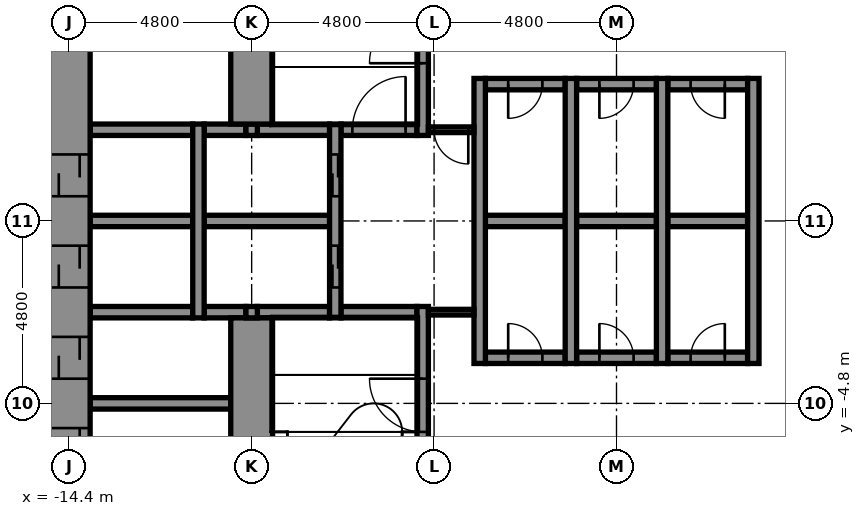
"""IFC4 building model, lengths in metres.
Left out: names, types, materials, properties, quantities, classifications, styles, units other than length and angle.
Written with IfcOpenShell. Run it as: python <this file> out.ifc"""

import sys

from ifc_helpers import new_model, si_unit, direction, frame, frame_2d, origin, place, context, subcontext, project, spatial, rectangle, extrude, element, fill, save


model = new_model("IFC4")
c1 = context("Model", 3, precision=1e-05, world=origin(), true_north=direction((0.0, 1.0)))
c2 = subcontext(c1, "Body", "Model", "MODEL_VIEW")
j1 = project(units=[si_unit("LENGTHUNIT", "METRE"), si_unit("PLANEANGLEUNIT", "RADIAN")], contexts=[c1])
p1 = place(None, origin())
s1 = spatial("IfcSite", under=j1, at=p1, CompositionType="ELEMENT")
p2 = place(p1, origin())
s2 = spatial("IfcBuilding", under=s1, at=p2, CompositionType="ELEMENT")
p3 = place(p2, frame((0.0, 0.0, 17.4)))
s3 = spatial("IfcBuildingStorey", under=s2, at=p3, CompositionType="ELEMENT", Elevation=17.4)
p4 = place(p3, frame((-13.85, -4.8, -0.25), z_axis=(0.0, 0.0, 1.0), x_axis=(1.0, 0.0, 0.0)))
e1 = element("IfcWall", 1, at=p4, inside=s3, PredefinedType="STANDARD", context=c2, shape_type="SweptSolid", body=[
    extrude(rectangle(XDim=3.7, YDim=0.3, at=frame_2d((1.85, 0.0))), origin(), (0.0, 0.0, 1.0), 5.0),
])
p5 = place(p3, frame((-3.45, -3.6, -0.25), z_axis=(0.0, 0.0, 1.0), x_axis=(1.0, 0.0, 0.0)))
e2 = element("IfcWall", 2, at=p5, inside=s3, PredefinedType="STANDARD", context=c2, shape_type="SweptSolid", body=[
    extrude(rectangle(XDim=2.1, YDim=0.3, at=frame_2d((1.05, 0.0))), origin(), (0.0, 0.0, 1.0), 5.0),
])
p6 = place(p5, frame((0.6, 0.0, 0.25)))
e3 = element("IfcOpeningElement", 3, at=p6, cuts=e2, PredefinedType="OPENING", context=c2, shape_type="SweptSolid", body=[
    extrude(rectangle(XDim=0.9, YDim=2.1, at=frame_2d((0.45, 1.05))), frame((0.0, 0.16, 0.0), z_axis=(0.0, -1.0, 0.0), x_axis=(1.0, 0.0, 0.0)), (0.0, 0.0, 1.0), 0.32),
])
p7 = place(p3, frame((-1.05, -3.6, -0.25), z_axis=(0.0, 0.0, 1.0), x_axis=(1.0, 0.0, 0.0)))
e4 = element("IfcWall", 4, at=p7, inside=s3, PredefinedType="STANDARD", context=c2, shape_type="SweptSolid", body=[
    extrude(rectangle(XDim=2.1, YDim=0.3, at=frame_2d((1.05, 0.0))), origin(), (0.0, 0.0, 1.0), 5.0),
])
p8 = place(p7, frame((0.6, 0.0, 0.25)))
e5 = element("IfcOpeningElement", 5, at=p8, cuts=e4, PredefinedType="OPENING", context=c2, shape_type="SweptSolid", body=[
    extrude(rectangle(XDim=0.9, YDim=2.1, at=frame_2d((0.45, 1.05))), frame((0.0, 0.16, 0.0), z_axis=(0.0, -1.0, 0.0), x_axis=(1.0, 0.0, 0.0)), (0.0, 0.0, 1.0), 0.32),
])
p9 = place(p3, frame((1.35, -3.6, -0.25), z_axis=(0.0, 0.0, 1.0), x_axis=(1.0, 0.0, 0.0)))
e6 = element("IfcWall", 6, at=p9, inside=s3, PredefinedType="STANDARD", context=c2, shape_type="SweptSolid", body=[
    extrude(rectangle(XDim=2.1, YDim=0.3, at=frame_2d((1.05, 0.0))), origin(), (0.0, 0.0, 1.0), 5.0),
])
p10 = place(p9, frame((0.6, 0.0, 0.25)))
e7 = element("IfcOpeningElement", 7, at=p10, cuts=e6, PredefinedType="OPENING", context=c2, shape_type="SweptSolid", body=[
    extrude(rectangle(XDim=0.9, YDim=2.1, at=frame_2d((0.45, 1.05))), frame((0.0, 0.16, 0.0), z_axis=(0.0, -1.0, 0.0), x_axis=(1.0, 0.0, 0.0)), (0.0, 0.0, 1.0), 0.32),
])
p11 = place(p3, frame((-13.85, -2.4, -0.25), z_axis=(0.0, 0.0, 1.0), x_axis=(1.0, 0.0, 0.0)))
e8 = element("IfcWall", 8, at=p11, inside=s3, PredefinedType="STANDARD", context=c2, shape_type="SweptSolid", body=[
    extrude(rectangle(XDim=2.7, YDim=0.3, at=frame_2d((1.35, 0.0))), origin(), (0.0, 0.0, 1.0), 5.0),
])
p12 = place(p3, frame((-10.85, -2.4, -0.25), z_axis=(0.0, 0.0, 1.0), x_axis=(1.0, 0.0, 0.0)))
e9 = element("IfcWall", 9, at=p12, inside=s3, PredefinedType="STANDARD", context=c2, shape_type="SweptSolid", body=[
    extrude(rectangle(XDim=1.1, YDim=0.3, at=frame_2d((0.55, 0.0))), origin(), (0.0, 0.0, 1.0), 5.0),
])
p13 = place(p3, frame((-9.45, -2.4, -0.25), z_axis=(0.0, 0.0, 1.0), x_axis=(1.0, 0.0, 0.0)))
e10 = element("IfcWall", 10, at=p13, inside=s3, PredefinedType="STANDARD", context=c2, shape_type="SweptSolid", body=[
    extrude(rectangle(XDim=1.9, YDim=0.3, at=frame_2d((0.95, 0.0))), origin(), (0.0, 0.0, 1.0), 5.0),
])
p14 = place(p3, frame((-7.25, -2.4, -0.25), z_axis=(0.0, 0.0, 1.0), x_axis=(1.0, 0.0, 0.0)))
e11 = element("IfcWall", 11, at=p14, inside=s3, PredefinedType="STANDARD", context=c2, shape_type="SweptSolid", body=[
    extrude(rectangle(XDim=2.0, YDim=0.3, at=frame_2d((1.0, 0.0))), origin(), (0.0, 0.0, 1.0), 5.0),
])
p15 = place(p3, frame((-13.85, 0.0, -0.25), z_axis=(0.0, 0.0, 1.0), x_axis=(1.0, 0.0, 0.0)))
e12 = element("IfcWall", 12, at=p15, inside=s3, PredefinedType="STANDARD", context=c2, shape_type="SweptSolid", body=[
    extrude(rectangle(XDim=2.7, YDim=0.3, at=frame_2d((1.35, 0.0))), origin(), (0.0, 0.0, 1.0), 5.0),
])
p16 = place(p3, frame((-10.85, 0.0, -0.25), z_axis=(0.0, 0.0, 1.0), x_axis=(1.0, 0.0, 0.0)))
e13 = element("IfcWall", 13, at=p16, inside=s3, PredefinedType="STANDARD", context=c2, shape_type="SweptSolid", body=[
    extrude(rectangle(XDim=3.3, YDim=0.3, at=frame_2d((1.65, 0.0))), origin(), (0.0, 0.0, 1.0), 5.0),
])
p17 = place(p3, frame((-3.45, 0.0, -0.25), z_axis=(0.0, 0.0, 1.0), x_axis=(1.0, 0.0, 0.0)))
e14 = element("IfcWall", 14, at=p17, inside=s3, PredefinedType="STANDARD", context=c2, shape_type="SweptSolid", body=[
    extrude(rectangle(XDim=2.1, YDim=0.3, at=frame_2d((1.05, 0.0))), origin(), (0.0, 0.0, 1.0), 5.0),
])
p18 = place(p3, frame((-1.05, 0.0, -0.25), z_axis=(0.0, 0.0, 1.0), x_axis=(1.0, 0.0, 0.0)))
e15 = element("IfcWall", 15, at=p18, inside=s3, PredefinedType="STANDARD", context=c2, shape_type="SweptSolid", body=[
    extrude(rectangle(XDim=2.1, YDim=0.3, at=frame_2d((1.05, 0.0))), origin(), (0.0, 0.0, 1.0), 5.0),
])
p19 = place(p3, frame((1.35, 0.0, -0.25), z_axis=(0.0, 0.0, 1.0), x_axis=(1.0, 0.0, 0.0)))
e16 = element("IfcWall", 16, at=p19, inside=s3, PredefinedType="STANDARD", context=c2, shape_type="SweptSolid", body=[
    extrude(rectangle(XDim=2.1, YDim=0.3, at=frame_2d((1.05, 0.0))), origin(), (0.0, 0.0, 1.0), 5.0),
])
p20 = place(p3, frame((-13.85, 2.4, -0.25), z_axis=(0.0, 0.0, 1.0), x_axis=(1.0, 0.0, 0.0)))
e17 = element("IfcWall", 17, at=p20, inside=s3, PredefinedType="STANDARD", context=c2, shape_type="SweptSolid", body=[
    extrude(rectangle(XDim=2.7, YDim=0.3, at=frame_2d((1.35, 0.0))), origin(), (0.0, 0.0, 1.0), 5.0),
])
p21 = place(p3, frame((-10.85, 2.4, -0.25), z_axis=(0.0, 0.0, 1.0), x_axis=(1.0, 0.0, 0.0)))
e18 = element("IfcWall", 18, at=p21, inside=s3, PredefinedType="STANDARD", context=c2, shape_type="SweptSolid", body=[
    extrude(rectangle(XDim=1.1, YDim=0.3, at=frame_2d((0.55, 0.0))), origin(), (0.0, 0.0, 1.0), 5.0),
])
p22 = place(p3, frame((-9.45, 2.4, -0.25), z_axis=(0.0, 0.0, 1.0), x_axis=(1.0, 0.0, 0.0)))
e19 = element("IfcWall", 19, at=p22, inside=s3, PredefinedType="STANDARD", context=c2, shape_type="SweptSolid", body=[
    extrude(rectangle(XDim=1.9, YDim=0.3, at=frame_2d((0.95, 0.0))), origin(), (0.0, 0.0, 1.0), 5.0),
])
p23 = place(p3, frame((-7.25, 2.4, -0.25), z_axis=(0.0, 0.0, 1.0), x_axis=(1.0, 0.0, 0.0)))
e20 = element("IfcWall", 20, at=p23, inside=s3, PredefinedType="STANDARD", context=c2, shape_type="SweptSolid", body=[
    extrude(rectangle(XDim=2.0, YDim=0.3, at=frame_2d((1.0, 0.0))), origin(), (0.0, 0.0, 1.0), 5.0),
])
p24 = place(p23, frame((0.3, 0.0, 0.25)))
e21 = element("IfcOpeningElement", 21, at=p24, cuts=e20, PredefinedType="OPENING", context=c2, shape_type="SweptSolid", body=[
    extrude(rectangle(XDim=1.4, YDim=2.1, at=frame_2d((0.7, 1.05))), frame((0.0, 0.16, 0.0), z_axis=(0.0, -1.0, 0.0), x_axis=(1.0, 0.0, 0.0)), (0.0, 0.0, 1.0), 0.32),
])
p25 = place(p3, frame((-3.45, 3.6, -0.25), z_axis=(0.0, 0.0, 1.0), x_axis=(1.0, 0.0, 0.0)))
e22 = element("IfcWall", 22, at=p25, inside=s3, PredefinedType="STANDARD", context=c2, shape_type="SweptSolid", body=[
    extrude(rectangle(XDim=2.1, YDim=0.3, at=frame_2d((1.05, 0.0))), origin(), (0.0, 0.0, 1.0), 5.0),
])
p26 = place(p25, frame((0.6, 0.0, 0.25)))
e23 = element("IfcOpeningElement", 23, at=p26, cuts=e22, PredefinedType="OPENING", context=c2, shape_type="SweptSolid", body=[
    extrude(rectangle(XDim=0.9, YDim=2.1, at=frame_2d((0.45, 1.05))), frame((0.0, 0.16, 0.0), z_axis=(0.0, -1.0, 0.0), x_axis=(1.0, 0.0, 0.0)), (0.0, 0.0, 1.0), 0.32),
])
p27 = place(p3, frame((-1.05, 3.6, -0.25), z_axis=(0.0, 0.0, 1.0), x_axis=(1.0, 0.0, 0.0)))
e24 = element("IfcWall", 24, at=p27, inside=s3, PredefinedType="STANDARD", context=c2, shape_type="SweptSolid", body=[
    extrude(rectangle(XDim=2.1, YDim=0.3, at=frame_2d((1.05, 0.0))), origin(), (0.0, 0.0, 1.0), 5.0),
])
p28 = place(p27, frame((0.6, 0.0, 0.25)))
e25 = element("IfcOpeningElement", 25, at=p28, cuts=e24, PredefinedType="OPENING", context=c2, shape_type="SweptSolid", body=[
    extrude(rectangle(XDim=0.9, YDim=2.1, at=frame_2d((0.45, 1.05))), frame((0.0, 0.16, 0.0), z_axis=(0.0, -1.0, 0.0), x_axis=(1.0, 0.0, 0.0)), (0.0, 0.0, 1.0), 0.32),
])
p29 = place(p3, frame((1.35, 3.6, -0.25), z_axis=(0.0, 0.0, 1.0), x_axis=(1.0, 0.0, 0.0)))
e26 = element("IfcWall", 26, at=p29, inside=s3, PredefinedType="STANDARD", context=c2, shape_type="SweptSolid", body=[
    extrude(rectangle(XDim=2.1, YDim=0.3, at=frame_2d((1.05, 0.0))), origin(), (0.0, 0.0, 1.0), 5.0),
])
p30 = place(p29, frame((0.6, 0.0, 0.25)))
e27 = element("IfcOpeningElement", 27, at=p30, cuts=e26, PredefinedType="OPENING", context=c2, shape_type="SweptSolid", body=[
    extrude(rectangle(XDim=0.9, YDim=2.1, at=frame_2d((0.45, 1.05))), frame((0.0, 0.16, 0.0), z_axis=(0.0, -1.0, 0.0), x_axis=(1.0, 0.0, 0.0)), (0.0, 0.0, 1.0), 0.32),
])
p31 = place(p3, frame((-14.4, -10.15, -0.25), z_axis=(0.0, 0.0, 1.0), x_axis=(0.0, 1.0, 0.0)))
e28 = element("IfcWall", 28, at=p31, inside=s3, PredefinedType="SHEAR", context=c2, shape_type="SweptSolid", body=[
    extrude(rectangle(XDim=20.3, YDim=1.1, at=frame_2d((10.15, 0.0))), origin(), (0.0, 0.0, 1.0), 5.0),
])
p32 = place(p31, frame((3.6, 0.0, 0.25)))
e29 = element("IfcOpeningElement", 29, at=p32, cuts=e28, PredefinedType="OPENING", context=c2, shape_type="SweptSolid", body=[
    extrude(rectangle(XDim=1.1, YDim=2.1, at=frame_2d((0.55, 1.05))), frame((0.0, 0.56, 0.0), z_axis=(0.0, -1.0, 0.0), x_axis=(1.0, 0.0, 0.0)), (0.0, 0.0, 1.0), 1.12),
])
p33 = place(p31, frame((6.0, 0.0, 0.25)))
e30 = element("IfcOpeningElement", 30, at=p33, cuts=e28, PredefinedType="OPENING", context=c2, shape_type="SweptSolid", body=[
    extrude(rectangle(XDim=1.1, YDim=2.1, at=frame_2d((0.55, 1.05))), frame((0.0, 0.56, 0.0), z_axis=(0.0, -1.0, 0.0), x_axis=(1.0, 0.0, 0.0)), (0.0, 0.0, 1.0), 1.12),
])
p34 = place(p31, frame((8.4, 0.0, 0.25)))
e31 = element("IfcOpeningElement", 31, at=p34, cuts=e28, PredefinedType="OPENING", context=c2, shape_type="SweptSolid", body=[
    extrude(rectangle(XDim=1.1, YDim=2.1, at=frame_2d((0.55, 1.05))), frame((0.0, 0.56, 0.0), z_axis=(0.0, -1.0, 0.0), x_axis=(1.0, 0.0, 0.0)), (0.0, 0.0, 1.0), 1.12),
])
p35 = place(p31, frame((10.8, 0.0, 0.25)))
e32 = element("IfcOpeningElement", 32, at=p35, cuts=e28, PredefinedType="OPENING", context=c2, shape_type="SweptSolid", body=[
    extrude(rectangle(XDim=1.1, YDim=2.1, at=frame_2d((0.55, 1.05))), frame((0.0, 0.56, 0.0), z_axis=(0.0, -1.0, 0.0), x_axis=(1.0, 0.0, 0.0)), (0.0, 0.0, 1.0), 1.12),
])
p36 = place(p3, frame((-11.0, -2.55, -0.25), z_axis=(0.0, 0.0, 1.0), x_axis=(0.0, 1.0, 0.0)))
e33 = element("IfcWall", 33, at=p36, inside=s3, PredefinedType="STANDARD", context=c2, shape_type="SweptSolid", body=[
    extrude(rectangle(XDim=5.1, YDim=0.3, at=frame_2d((2.55, 0.0))), origin(), (0.0, 0.0, 1.0), 5.0),
])
p37 = place(p3, frame((-9.6, -10.15, -0.25), z_axis=(0.0, 0.0, 1.0), x_axis=(0.0, 1.0, 0.0)))
e34 = element("IfcWall", 34, at=p37, inside=s3, PredefinedType="SHEAR", context=c2, shape_type="SweptSolid", body=[
    extrude(rectangle(XDim=7.6, YDim=1.1, at=frame_2d((3.8, 0.0))), origin(), (0.0, 0.0, 1.0), 5.0),
])
for number, where, z_axis, x_axis in (
    (35, (-9.6, -2.55, -0.25), (0.0, 0.0, 1.0), (0.0, 1.0, 0.0)),
    (36, (-9.6, 2.25, -0.25), (0.0, 0.0, 1.0), (0.0, 1.0, 0.0)),
):
    element("IfcWall", number, at=place(p3, frame(where, z_axis=z_axis, x_axis=x_axis)), inside=s3, PredefinedType="STANDARD", context=c2, shape_type="SweptSolid", body=[
        extrude(rectangle(XDim=0.3, YDim=0.3, at=frame_2d((0.15, 0.0))), origin(), (0.0, 0.0, 1.0), 5.0),
    ])
p38 = place(p3, frame((-9.6, 2.55, -0.25), z_axis=(0.0, 0.0, 1.0), x_axis=(0.0, 1.0, 0.0)))
e37 = element("IfcWall", 37, at=p38, inside=s3, PredefinedType="SHEAR", context=c2, shape_type="SweptSolid", body=[
    extrude(rectangle(XDim=7.6, YDim=1.1, at=frame_2d((3.8, 0.0))), origin(), (0.0, 0.0, 1.0), 5.0),
])
p39 = place(p3, frame((-7.4, -2.55, -0.25), z_axis=(0.0, 0.0, 1.0), x_axis=(0.0, 1.0, 0.0)))
e38 = element("IfcWall", 38, at=p39, inside=s3, PredefinedType="STANDARD", context=c2, shape_type="SweptSolid", body=[
    extrude(rectangle(XDim=5.1, YDim=0.3, at=frame_2d((2.55, 0.0))), origin(), (0.0, 0.0, 1.0), 5.0),
])
p40 = place(p39, frame((0.8, 0.0, 0.25)))
e39 = element("IfcOpeningElement", 39, at=p40, cuts=e38, PredefinedType="OPENING", context=c2, shape_type="SweptSolid", body=[
    extrude(rectangle(XDim=1.1, YDim=2.1, at=frame_2d((0.55, 1.05))), frame((0.0, 0.16, 0.0), z_axis=(0.0, -1.0, 0.0), x_axis=(1.0, 0.0, 0.0)), (0.0, 0.0, 1.0), 0.32),
])
p41 = place(p39, frame((3.2, 0.0, 0.25)))
e40 = element("IfcOpeningElement", 40, at=p41, cuts=e38, PredefinedType="OPENING", context=c2, shape_type="SweptSolid", body=[
    extrude(rectangle(XDim=1.1, YDim=2.1, at=frame_2d((0.55, 1.05))), frame((0.0, 0.16, 0.0), z_axis=(0.0, -1.0, 0.0), x_axis=(1.0, 0.0, 0.0)), (0.0, 0.0, 1.0), 0.32),
])
p42 = place(p3, frame((-5.1, -9.05, -0.25), z_axis=(0.0, 0.0, 1.0), x_axis=(0.0, 1.0, 0.0)))
e41 = element("IfcWall", 41, at=p42, inside=s3, PredefinedType="STANDARD", context=c2, shape_type="SweptSolid", body=[
    extrude(rectangle(XDim=6.8, YDim=0.3, at=frame_2d((3.4, 0.0))), origin(), (0.0, 0.0, 1.0), 5.0),
])
p43 = place(p42, frame((3.5, 0.0, 0.25)))
e42 = element("IfcOpeningElement", 42, at=p43, cuts=e41, PredefinedType="OPENING", context=c2, shape_type="SweptSolid", body=[
    extrude(rectangle(XDim=1.4, YDim=2.1, at=frame_2d((0.7, 1.05))), frame((0.0, 0.16, 0.0), z_axis=(0.0, -1.0, 0.0), x_axis=(1.0, 0.0, 0.0)), (0.0, 0.0, 1.0), 0.32),
])
p44 = place(p3, frame((-5.1, 2.25, -0.25), z_axis=(0.0, 0.0, 1.0), x_axis=(0.0, 1.0, 0.0)))
e43 = element("IfcWall", 43, at=p44, inside=s3, PredefinedType="STANDARD", context=c2, shape_type="SweptSolid", body=[
    extrude(rectangle(XDim=6.8, YDim=0.3, at=frame_2d((3.4, 0.0))), origin(), (0.0, 0.0, 1.0), 5.0),
])
p45 = place(p44, frame((1.9, 0.0, 0.25)))
e44 = element("IfcOpeningElement", 44, at=p45, cuts=e43, PredefinedType="OPENING", context=c2, shape_type="SweptSolid", body=[
    extrude(rectangle(XDim=1.4, YDim=2.1, at=frame_2d((0.7, 1.05))), frame((0.0, 0.16, 0.0), z_axis=(0.0, -1.0, 0.0), x_axis=(1.0, 0.0, 0.0)), (0.0, 0.0, 1.0), 0.32),
])
for number, where, z_axis, x_axis in (
    (45, (-3.6, -3.75, -0.25), (0.0, 0.0, 1.0), (0.0, 1.0, 0.0)),
    (46, (-1.2, -3.75, -0.25), (0.0, 0.0, 1.0), (0.0, 1.0, 0.0)),
    (47, (1.2, -3.75, -0.25), (0.0, 0.0, 1.0), (0.0, 1.0, 0.0)),
    (48, (3.6, -3.75, -0.25), (0.0, 0.0, 1.0), (0.0, 1.0, 0.0)),
):
    element("IfcWall", number, at=place(p3, frame(where, z_axis=z_axis, x_axis=x_axis)), inside=s3, PredefinedType="STANDARD", context=c2, shape_type="SweptSolid", body=[
        extrude(rectangle(XDim=7.5, YDim=0.3, at=frame_2d((3.75, 0.0))), origin(), (0.0, 0.0, 1.0), 5.0),
    ])
p46 = place(p3, frame((-4.95, 2.4, 0.0), z_axis=(0.0, 0.0, 1.0), x_axis=(1.0, 0.0, 0.0)))
e49 = element("IfcWall", 49, at=p46, inside=s3, PredefinedType="PARTITIONING", context=c2, shape_type="SweptSolid", body=[
    extrude(rectangle(XDim=1.2, YDim=0.15, at=frame_2d((0.6, 0.0))), origin(), (0.0, 0.0, 1.0), 4.75),
])
p47 = place(p46, frame((0.15, 0.0, 0.0)))
e50 = element("IfcOpeningElement", 50, at=p47, cuts=e49, PredefinedType="OPENING", context=c2, shape_type="SweptSolid", body=[
    extrude(rectangle(XDim=0.9, YDim=2.1, at=frame_2d((0.45, 1.05))), frame((0.0, 0.085, 0.0), z_axis=(0.0, -1.0, 0.0), x_axis=(1.0, 0.0, 0.0)), (0.0, 0.0, 1.0), 0.17),
])
p48 = place(p3, frame((-4.95, -2.4, 0.0), z_axis=(0.0, 0.0, 1.0), x_axis=(1.0, 0.0, 0.0)))
e51 = element("IfcWall", 51, at=p48, inside=s3, PredefinedType="PARTITIONING", context=c2, shape_type="SweptSolid", body=[
    extrude(rectangle(XDim=1.2, YDim=0.15, at=frame_2d((0.6, 0.0))), origin(), (0.0, 0.0, 1.0), 4.75),
])
p49 = place(p40, origin())
e52 = element("IfcDoor", 52, at=p49, inside=s3, OperationType="DOUBLE_DOOR_SLIDING", PredefinedType="DOOR", context=c2, shape_type="SweptSolid", body=[
    extrude(rectangle(XDim=1.1, YDim=2.1, at=frame_2d((0.55, 1.05))), frame((0.0, 0.025, 0.0), z_axis=(0.0, -1.0, 0.0), x_axis=(1.0, 0.0, 0.0)), (0.0, 0.0, 1.0), 0.05),
])
fill(e39, e52)
p50 = place(p41, origin())
e53 = element("IfcDoor", 53, at=p50, inside=s3, OperationType="DOUBLE_DOOR_SLIDING", PredefinedType="DOOR", context=c2, shape_type="SweptSolid", body=[
    extrude(rectangle(XDim=1.1, YDim=2.1, at=frame_2d((0.55, 1.05))), frame((0.0, 0.025, 0.0), z_axis=(0.0, -1.0, 0.0), x_axis=(1.0, 0.0, 0.0)), (0.0, 0.0, 1.0), 0.05),
])
fill(e40, e53)
p51 = place(p32, origin())
e54 = element("IfcDoor", 54, at=p51, inside=s3, OperationType="DOUBLE_DOOR_SLIDING", PredefinedType="DOOR", context=c2, shape_type="SweptSolid", body=[
    extrude(rectangle(XDim=1.1, YDim=2.1, at=frame_2d((0.55, 1.05))), frame((0.0, 0.025, 0.0), z_axis=(0.0, -1.0, 0.0), x_axis=(1.0, 0.0, 0.0)), (0.0, 0.0, 1.0), 0.05),
])
fill(e29, e54)
p52 = place(p33, origin())
e55 = element("IfcDoor", 55, at=p52, inside=s3, OperationType="DOUBLE_DOOR_SLIDING", PredefinedType="DOOR", context=c2, shape_type="SweptSolid", body=[
    extrude(rectangle(XDim=1.1, YDim=2.1, at=frame_2d((0.55, 1.05))), frame((0.0, 0.025, 0.0), z_axis=(0.0, -1.0, 0.0), x_axis=(1.0, 0.0, 0.0)), (0.0, 0.0, 1.0), 0.05),
])
fill(e30, e55)
p53 = place(p34, origin())
e56 = element("IfcDoor", 56, at=p53, inside=s3, OperationType="DOUBLE_DOOR_SLIDING", PredefinedType="DOOR", context=c2, shape_type="SweptSolid", body=[
    extrude(rectangle(XDim=1.1, YDim=2.1, at=frame_2d((0.55, 1.05))), frame((0.0, 0.025, 0.0), z_axis=(0.0, -1.0, 0.0), x_axis=(1.0, 0.0, 0.0)), (0.0, 0.0, 1.0), 0.05),
])
fill(e31, e56)
p54 = place(p35, origin())
e57 = element("IfcDoor", 57, at=p54, inside=s3, OperationType="DOUBLE_DOOR_SLIDING", PredefinedType="DOOR", context=c2, shape_type="SweptSolid", body=[
    extrude(rectangle(XDim=1.1, YDim=2.1, at=frame_2d((0.55, 1.05))), frame((0.0, 0.025, 0.0), z_axis=(0.0, -1.0, 0.0), x_axis=(1.0, 0.0, 0.0)), (0.0, 0.0, 1.0), 0.05),
])
fill(e32, e57)
p55 = place(p45, origin())
e58 = element("IfcDoor", 58, at=p55, inside=s3, OperationType="SINGLE_SWING_LEFT", PredefinedType="DOOR", context=c2, shape_type="SweptSolid", body=[
    extrude(rectangle(XDim=1.4, YDim=2.1, at=frame_2d((0.7, 1.05))), frame((0.0, 0.025, 0.0), z_axis=(0.0, -1.0, 0.0), x_axis=(1.0, 0.0, 0.0)), (0.0, 0.0, 1.0), 0.05),
])
fill(e44, e58)
p56 = place(p43, origin())
e59 = element("IfcDoor", 59, at=p56, inside=s3, OperationType="SINGLE_SWING_RIGHT", PredefinedType="DOOR", context=c2, shape_type="SweptSolid", body=[
    extrude(rectangle(XDim=1.4, YDim=2.1, at=frame_2d((0.7, 1.05))), frame((0.0, 0.025, 0.0), z_axis=(0.0, -1.0, 0.0), x_axis=(1.0, 0.0, 0.0)), (0.0, 0.0, 1.0), 0.05),
])
fill(e42, e59)
p57 = place(p26, frame((0.9, 0.0, 0.0), z_axis=(0.0, 0.0, 1.0), x_axis=(-1.0, 0.0, 0.0)))
e60 = element("IfcDoor", 60, at=p57, inside=s3, OperationType="SINGLE_SWING_LEFT", PredefinedType="DOOR", context=c2, shape_type="SweptSolid", body=[
    extrude(rectangle(XDim=0.9, YDim=2.1, at=frame_2d((0.45, 1.05))), frame((0.0, 0.025, 0.0), z_axis=(0.0, -1.0, 0.0), x_axis=(1.0, 0.0, 0.0)), (0.0, 0.0, 1.0), 0.05),
])
fill(e23, e60)
p58 = place(p28, frame((0.9, 0.0, 0.0), z_axis=(0.0, 0.0, 1.0), x_axis=(-1.0, 0.0, 0.0)))
e61 = element("IfcDoor", 61, at=p58, inside=s3, OperationType="SINGLE_SWING_LEFT", PredefinedType="DOOR", context=c2, shape_type="SweptSolid", body=[
    extrude(rectangle(XDim=0.9, YDim=2.1, at=frame_2d((0.45, 1.05))), frame((0.0, 0.025, 0.0), z_axis=(0.0, -1.0, 0.0), x_axis=(1.0, 0.0, 0.0)), (0.0, 0.0, 1.0), 0.05),
])
fill(e25, e61)
p59 = place(p30, frame((0.9, 0.0, 0.0), z_axis=(0.0, 0.0, 1.0), x_axis=(-1.0, 0.0, 0.0)))
e62 = element("IfcDoor", 62, at=p59, inside=s3, OperationType="SINGLE_SWING_RIGHT", PredefinedType="DOOR", context=c2, shape_type="SweptSolid", body=[
    extrude(rectangle(XDim=0.9, YDim=2.1, at=frame_2d((0.45, 1.05))), frame((0.0, 0.025, 0.0), z_axis=(0.0, -1.0, 0.0), x_axis=(1.0, 0.0, 0.0)), (0.0, 0.0, 1.0), 0.05),
])
fill(e27, e62)
p60 = place(p6, origin())
e63 = element("IfcDoor", 63, at=p60, inside=s3, OperationType="SINGLE_SWING_LEFT", PredefinedType="DOOR", context=c2, shape_type="SweptSolid", body=[
    extrude(rectangle(XDim=0.9, YDim=2.1, at=frame_2d((0.45, 1.05))), frame((0.0, 0.025, 0.0), z_axis=(0.0, -1.0, 0.0), x_axis=(1.0, 0.0, 0.0)), (0.0, 0.0, 1.0), 0.05),
])
fill(e3, e63)
p61 = place(p8, origin())
e64 = element("IfcDoor", 64, at=p61, inside=s3, OperationType="SINGLE_SWING_LEFT", PredefinedType="DOOR", context=c2, shape_type="SweptSolid", body=[
    extrude(rectangle(XDim=0.9, YDim=2.1, at=frame_2d((0.45, 1.05))), frame((0.0, 0.025, 0.0), z_axis=(0.0, -1.0, 0.0), x_axis=(1.0, 0.0, 0.0)), (0.0, 0.0, 1.0), 0.05),
])
fill(e5, e64)
p62 = place(p10, origin())
e65 = element("IfcDoor", 65, at=p62, inside=s3, OperationType="SINGLE_SWING_RIGHT", PredefinedType="DOOR", context=c2, shape_type="SweptSolid", body=[
    extrude(rectangle(XDim=0.9, YDim=2.1, at=frame_2d((0.45, 1.05))), frame((0.0, 0.025, 0.0), z_axis=(0.0, -1.0, 0.0), x_axis=(1.0, 0.0, 0.0)), (0.0, 0.0, 1.0), 0.05),
])
fill(e7, e65)
p63 = place(p47, frame((0.9, 0.0, 0.0), z_axis=(0.0, 0.0, 1.0), x_axis=(-1.0, 0.0, 0.0)))
e66 = element("IfcDoor", 66, at=p63, inside=s3, OperationType="SINGLE_SWING_RIGHT", PredefinedType="DOOR", context=c2, shape_type="SweptSolid", body=[
    extrude(rectangle(XDim=0.9, YDim=2.1, at=frame_2d((0.45, 1.05))), frame((0.0, 0.025, 0.0), z_axis=(0.0, -1.0, 0.0), x_axis=(1.0, 0.0, 0.0)), (0.0, 0.0, 1.0), 0.05),
])
fill(e50, e66)
p64 = place(p24, origin())
e67 = element("IfcDoor", 67, at=p64, inside=s3, OperationType="SINGLE_SWING_RIGHT", PredefinedType="DOOR", context=c2, shape_type="SweptSolid", body=[
    extrude(rectangle(XDim=1.4, YDim=2.1, at=frame_2d((0.7, 1.05))), frame((0.0, 0.025, 0.0), z_axis=(0.0, -1.0, 0.0), x_axis=(1.0, 0.0, 0.0)), (0.0, 0.0, 1.0), 0.05),
])
fill(e21, e67)
save(model, sys.argv[1])
